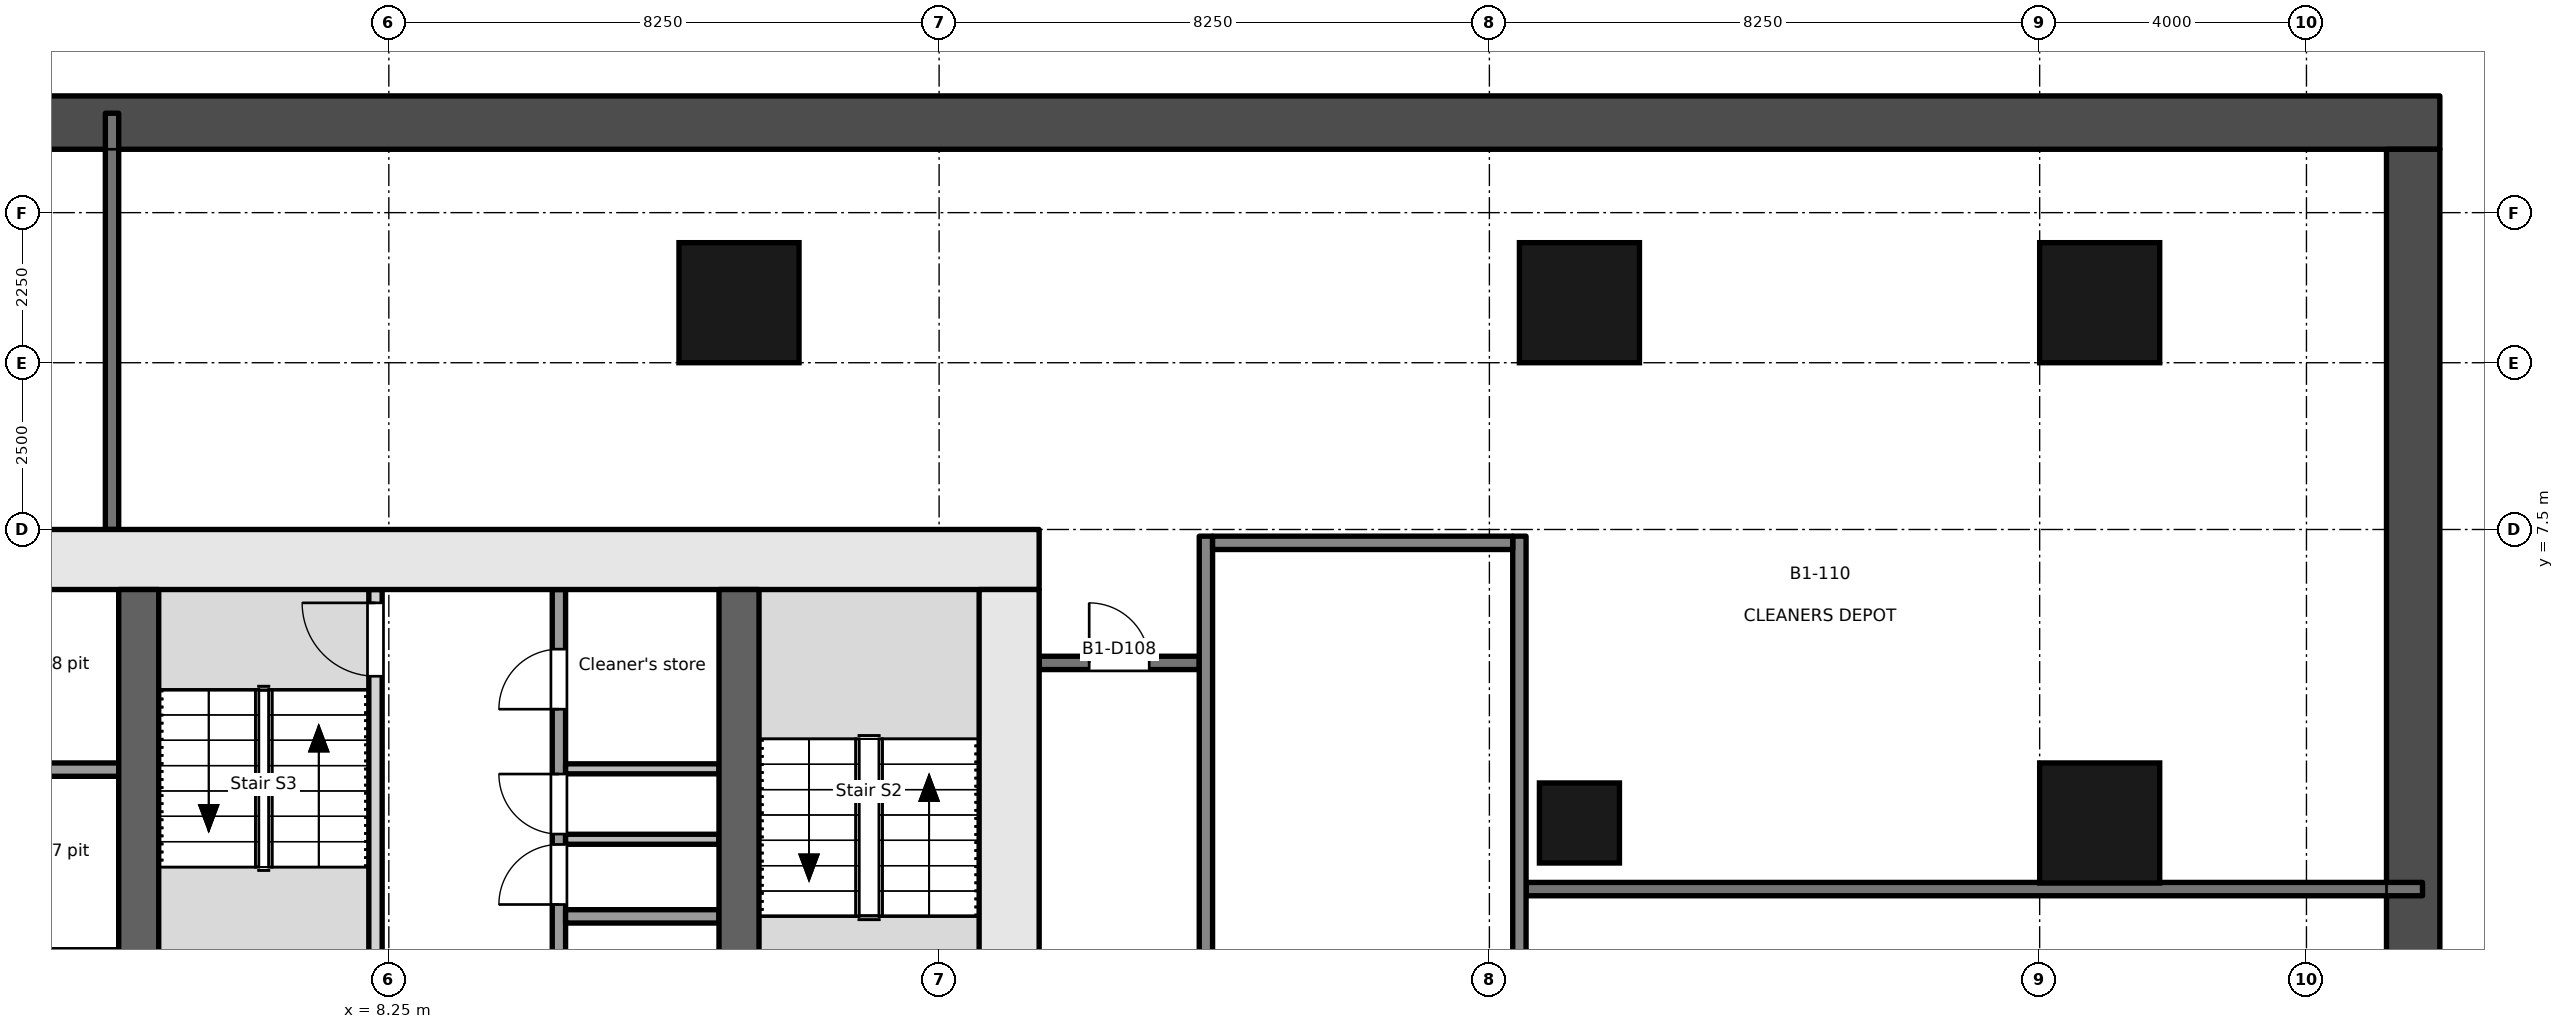
"""IFC4 building model, lengths in metres.
Left out: names, types, materials, properties, quantities, classifications, styles, units other than length and angle.
Written with IfcOpenShell. Run it as: python <this file> out.ifc"""

import sys

from ifc_helpers import new_model, si_unit, direction, frame, frame_2d, origin, origin_2d, place, context, subcontext, project, spatial, rectangle, extrude, element, fill, save


model = new_model("IFC4")
c1 = context("Model", 3, precision=1e-05, world=origin(), true_north=direction((0.0, 1.0)))
c2 = subcontext(c1, "Body", "Model", "MODEL_VIEW")
j1 = project(units=[si_unit("LENGTHUNIT", "METRE"), si_unit("PLANEANGLEUNIT", "RADIAN")], contexts=[c1])
p1 = place(None, origin())
s1 = spatial("IfcSite", under=j1, at=p1, CompositionType="ELEMENT")
p2 = place(p1, origin())
s2 = spatial("IfcBuilding", under=s1, at=p2, CompositionType="ELEMENT")
p3 = place(p2, frame((0.0, 0.0, -5.5)))
s3 = spatial("IfcBuildingStorey", under=s2, at=p3, CompositionType="ELEMENT", Elevation=-5.5)
p4 = place(p3, frame((-39.0, 13.6, -0.2), z_axis=(0.0, 0.0, 1.0), x_axis=(1.0, 0.0, 0.0)))
e1 = element("IfcWall", 1, at=p4, inside=s3, PredefinedType="SOLIDWALL", context=c2, shape_type="SweptSolid", body=[
    extrude(rectangle(XDim=78.0, YDim=0.8, at=frame_2d((39.0, 0.0))), origin(), (0.0, 0.0, 1.0), 5.5),
])
p5 = place(p3, frame((38.6, -38.7, -0.2), z_axis=(0.0, 0.0, 1.0), x_axis=(0.0, 1.0, 0.0)))
e2 = element("IfcWall", 2, at=p5, inside=s3, PredefinedType="SOLIDWALL", context=c2, shape_type="SweptSolid", body=[
    extrude(rectangle(XDim=51.9, YDim=0.8, at=frame_2d((25.95, 0.0))), origin(), (0.0, 0.0, 1.0), 5.5),
])
for number, where, z_axis, x_axis in (
    (3, (33.9, 10.9, -0.2), (0.0, 0.0, 1.0), (1.0, 0.0, 0.0)),
    (4, (33.9, 3.1, -0.2), (0.0, 0.0, 1.0), (0.0, 1.0, 0.0)),
    (5, (13.5, 10.9, -0.2), (0.0, 0.0, 1.0), (1.0, 0.0, 0.0)),
    (6, (26.1, 10.9, -0.2), (0.0, 0.0, 1.0), (1.0, 0.0, 0.0)),
):
    element("IfcColumn", number, at=place(p3, frame(where, z_axis=z_axis, x_axis=x_axis)), inside=s3, PredefinedType="COLUMN", context=c2, shape_type="SweptSolid", body=[
        extrude(rectangle(XDim=1.8, YDim=1.8, at=origin_2d()), origin(), (0.0, 0.0, 1.0), 5.5),
    ])
p6 = place(p3, frame((26.1, 3.1, -0.2), z_axis=(0.0, 0.0, 1.0), x_axis=(1.0, 0.0, 0.0)))
e7 = element("IfcColumn", 7, at=p6, inside=s3, PredefinedType="COLUMN", context=c2, shape_type="SweptSolid", body=[
    extrude(rectangle(XDim=1.2, YDim=1.2, at=origin_2d()), origin(), (0.0, 0.0, 1.0), 5.5),
])
p7 = place(p3, frame((-18.0, 7.05, -0.2), z_axis=(0.0, 0.0, 1.0), x_axis=(1.0, 0.0, 0.0)))
e8 = element("IfcWall", 8, at=p7, inside=s3, PredefinedType="SHEAR", context=c2, shape_type="SweptSolid", body=[
    extrude(rectangle(XDim=36.0, YDim=0.9, at=frame_2d((18.0, 0.0))), origin(), (0.0, 0.0, 1.0), 5.5),
])
p8 = place(p3, frame((17.55, -6.6, -0.2), z_axis=(0.0, 0.0, 1.0), x_axis=(0.0, 1.0, 0.0)))
e9 = element("IfcWall", 9, at=p8, inside=s3, PredefinedType="SHEAR", context=c2, shape_type="SweptSolid", body=[
    extrude(rectangle(XDim=13.2, YDim=0.9, at=frame_2d((6.6, 0.0))), origin(), (0.0, 0.0, 1.0), 5.5),
])
p9 = place(p8, frame((4.55, 0.0, 0.2)))
e10 = element("IfcOpeningElement", 10, at=p9, cuts=e9, PredefinedType="OPENING", context=c2, shape_type="SweptSolid", body=[
    extrude(rectangle(XDim=1.2, YDim=2.1, at=frame_2d((0.6, 1.05))), frame((0.0, 0.46, 0.0), z_axis=(0.0, -1.0, 0.0), x_axis=(1.0, 0.0, 0.0)), (0.0, 0.0, 1.0), 0.921),
])
for number, where, z_axis, x_axis in (
    (11, (4.5, -6.6, -0.2), (0.0, 0.0, 1.0), (0.0, 1.0, 0.0)),
    (12, (13.5, -6.6, -0.2), (0.0, 0.0, 1.0), (0.0, 1.0, 0.0)),
):
    element("IfcWall", number, at=place(p3, frame(where, z_axis=z_axis, x_axis=x_axis)), inside=s3, PredefinedType="SHEAR", context=c2, shape_type="SweptSolid", body=[
        extrude(rectangle(XDim=13.2, YDim=0.6, at=frame_2d((6.6, 0.0))), origin(), (0.0, 0.0, 1.0), 5.5),
    ])
p10 = place(p3, frame((1.9, 3.9, 0.0), z_axis=(0.0, 0.0, 1.0), x_axis=(1.0, 0.0, 0.0)))
e13 = element("IfcWall", 13, at=p10, inside=s3, PredefinedType="PARTITIONING", context=c2, shape_type="SweptSolid", body=[
    extrude(rectangle(XDim=2.3, YDim=0.2, at=frame_2d((1.15, 0.0))), origin(), (0.0, 0.0, 1.0), 5.3),
])
p11 = place(p3, frame((8.05, -6.6, 0.0), z_axis=(0.0, 0.0, 1.0), x_axis=(0.0, 1.0, 0.0)))
e14 = element("IfcWall", 14, at=p11, inside=s3, PredefinedType="PARTITIONING", context=c2, shape_type="SweptSolid", body=[
    extrude(rectangle(XDim=13.2, YDim=0.2, at=frame_2d((6.6, 0.0))), origin(), (0.0, 0.0, 1.0), 5.3),
])
p12 = place(p11, frame((0.502, 0.0, 0.0)))
e15 = element("IfcOpeningElement", 15, at=p12, cuts=e14, PredefinedType="OPENING", context=c2, shape_type="SweptSolid", body=[
    extrude(rectangle(XDim=0.9, YDim=2.1, at=frame_2d((0.45, 1.05))), frame((0.0, 0.111, 0.0), z_axis=(0.0, -1.0, 0.0), x_axis=(1.0, 0.0, 0.0)), (0.0, 0.0, 1.0), 0.221),
])
p13 = place(p11, frame((2.406, 0.0, 0.0)))
e16 = element("IfcOpeningElement", 16, at=p13, cuts=e14, PredefinedType="OPENING", context=c2, shape_type="SweptSolid", body=[
    extrude(rectangle(XDim=0.9, YDim=2.1, at=frame_2d((0.45, 1.05))), frame((0.0, 0.111, 0.0), z_axis=(0.0, -1.0, 0.0), x_axis=(1.0, 0.0, 0.0)), (0.0, 0.0, 1.0), 0.221),
])
p14 = place(p11, frame((4.854, 0.0, 0.0)))
e17 = element("IfcOpeningElement", 17, at=p14, cuts=e14, PredefinedType="OPENING", context=c2, shape_type="SweptSolid", body=[
    extrude(rectangle(XDim=0.9, YDim=2.1, at=frame_2d((0.45, 1.05))), frame((0.0, 0.111, 0.0), z_axis=(0.0, -1.0, 0.0), x_axis=(1.0, 0.0, 0.0)), (0.0, 0.0, 1.0), 0.221),
])
p15 = place(p11, frame((11.9, 0.0, 0.0)))
e18 = element("IfcOpeningElement", 18, at=p15, cuts=e14, PredefinedType="OPENING", context=c2, shape_type="SweptSolid", body=[
    extrude(rectangle(XDim=1.1, YDim=2.1, at=frame_2d((0.55, 1.05))), frame((0.0, 0.111, 0.0), z_axis=(0.0, -1.0, 0.0), x_axis=(1.0, 0.0, 0.0)), (0.0, 0.0, 1.0), 0.221),
])
p16 = place(p3, frame((10.8, -6.6, 0.0), z_axis=(0.0, 0.0, 1.0), x_axis=(0.0, 1.0, 0.0)))
e19 = element("IfcWall", 19, at=p16, inside=s3, PredefinedType="PARTITIONING", context=c2, shape_type="SweptSolid", body=[
    extrude(rectangle(XDim=13.2, YDim=0.2, at=frame_2d((6.6, 0.0))), origin(), (0.0, 0.0, 1.0), 5.3),
])
p17 = place(p16, frame((0.7, 0.0, 0.0)))
e20 = element("IfcOpeningElement", 20, at=p17, cuts=e19, PredefinedType="OPENING", context=c2, shape_type="SweptSolid", body=[
    extrude(rectangle(XDim=1.2, YDim=2.1, at=frame_2d((0.6, 1.05))), frame((0.0, 0.111, 0.0), z_axis=(0.0, -1.0, 0.0), x_axis=(1.0, 0.0, 0.0)), (0.0, 0.0, 1.0), 0.221),
])
p18 = place(p16, frame((8.478, 0.0, 0.0)))
e21 = element("IfcOpeningElement", 21, at=p18, cuts=e19, PredefinedType="OPENING", context=c2, shape_type="SweptSolid", body=[
    extrude(rectangle(XDim=0.9, YDim=2.1, at=frame_2d((0.45, 1.05))), frame((0.0, 0.111, 0.0), z_axis=(0.0, -1.0, 0.0), x_axis=(1.0, 0.0, 0.0)), (0.0, 0.0, 1.0), 0.221),
])
p19 = place(p16, frame((9.534, 0.0, 0.0)))
e22 = element("IfcOpeningElement", 22, at=p19, cuts=e19, PredefinedType="OPENING", context=c2, shape_type="SweptSolid", body=[
    extrude(rectangle(XDim=0.9, YDim=2.1, at=frame_2d((0.45, 1.05))), frame((0.0, 0.111, 0.0), z_axis=(0.0, -1.0, 0.0), x_axis=(1.0, 0.0, 0.0)), (0.0, 0.0, 1.0), 0.221),
])
p20 = place(p16, frame((11.406, 0.0, 0.0)))
e23 = element("IfcOpeningElement", 23, at=p20, cuts=e19, PredefinedType="OPENING", context=c2, shape_type="SweptSolid", body=[
    extrude(rectangle(XDim=0.9, YDim=2.1, at=frame_2d((0.45, 1.05))), frame((0.0, 0.111, 0.0), z_axis=(0.0, -1.0, 0.0), x_axis=(1.0, 0.0, 0.0)), (0.0, 0.0, 1.0), 0.221),
])
p21 = place(p3, frame((10.9, 1.7, 0.0), z_axis=(0.0, 0.0, 1.0), x_axis=(1.0, 0.0, 0.0)))
e24 = element("IfcWall", 24, at=p21, inside=s3, PredefinedType="PARTITIONING", context=c2, shape_type="SweptSolid", body=[
    extrude(rectangle(XDim=2.3, YDim=0.2, at=frame_2d((1.15, 0.0))), origin(), (0.0, 0.0, 1.0), 5.3),
])
for number, where, z_axis, x_axis in (
    (25, (10.9, 2.856, 0.0), (0.0, 0.0, 1.0), (1.0, 0.0, 0.0)),
    (26, (10.9, 3.912, 0.0), (0.0, 0.0, 1.0), (1.0, 0.0, 0.0)),
):
    element("IfcWall", number, at=place(p3, frame(where, z_axis=z_axis, x_axis=x_axis)), inside=s3, PredefinedType="PARTITIONING", context=c2, shape_type="SweptSolid", body=[
        extrude(rectangle(XDim=2.3, YDim=0.15, at=frame_2d((1.15, 0.0))), origin(), (0.0, 0.0, 1.0), 5.3),
    ])
for number, where, z_axis, x_axis in (
    (27, (20.5, 0.0, -0.2), (0.0, 0.0, 1.0), (0.0, 1.0, 0.0)),
    (28, (25.2, 0.0, -0.2), (0.0, 0.0, 1.0), (0.0, 1.0, 0.0)),
):
    element("IfcWall", number, at=place(p3, frame(where, z_axis=z_axis, x_axis=x_axis)), inside=s3, PredefinedType="SHEAR", context=c2, shape_type="SweptSolid", body=[
        extrude(rectangle(XDim=7.4, YDim=0.2, at=frame_2d((3.7, 0.0))), origin(), (0.0, 0.0, 1.0), 5.5),
    ])
p22 = place(p3, frame((20.6, 7.3, -0.2), z_axis=(0.0, 0.0, 1.0), x_axis=(1.0, 0.0, 0.0)))
e29 = element("IfcWall", 29, at=p22, inside=s3, PredefinedType="SHEAR", context=c2, shape_type="SweptSolid", body=[
    extrude(rectangle(XDim=4.5, YDim=0.2, at=frame_2d((2.25, 0.0))), origin(), (0.0, 0.0, 1.0), 5.5),
])
p23 = place(p3, frame((18.0, 5.5, 0.0), z_axis=(0.0, 0.0, 1.0), x_axis=(1.0, 0.0, 0.0)))
e30 = element("IfcWall", 30, at=p23, inside=s3, PredefinedType="PARTITIONING", context=c2, shape_type="SweptSolid", body=[
    extrude(rectangle(XDim=2.4, YDim=0.2, at=frame_2d((1.2, 0.0))), origin(), (0.0, 0.0, 1.0), 5.3),
])
p24 = place(p23, frame((0.75, 0.0, 0.0)))
e31 = element("IfcOpeningElement", 31, at=p24, cuts=e30, PredefinedType="OPENING", context=c2, shape_type="SweptSolid", body=[
    extrude(rectangle(XDim=0.9, YDim=2.1, at=frame_2d((0.45, 1.05))), frame((0.0, 0.111, 0.0), z_axis=(0.0, -1.0, 0.0), x_axis=(1.0, 0.0, 0.0)), (0.0, 0.0, 1.0), 0.221),
])
p25 = place(p3, frame((4.1, 13.74, 0.0), z_axis=(0.0, 0.0, 1.0), x_axis=(0.0, -1.0, 0.0)))
e32 = element("IfcWall", 32, at=p25, inside=s3, PredefinedType="PARTITIONING", context=c2, shape_type="SweptSolid", body=[
    extrude(rectangle(XDim=6.24, YDim=0.2, at=frame_2d((3.12, 0.0))), origin(), (0.0, 0.0, 1.0), 4.3),
])
p26 = place(p3, frame((25.3, 2.109, 0.0), z_axis=(0.0, 0.0, 1.0), x_axis=(1.0, 0.0, 0.0)))
e33 = element("IfcWall", 33, at=p26, inside=s3, PredefinedType="PARTITIONING", context=c2, shape_type="SweptSolid", body=[
    extrude(rectangle(XDim=13.44, YDim=0.2, at=frame_2d((6.72, 0.0))), origin(), (0.0, 0.0, 1.0), 4.1),
])
p27 = place(p15, origin())
e34 = element("IfcDoor", 34, at=p27, inside=s3, OperationType="SINGLE_SWING_RIGHT", PredefinedType="DOOR", context=c2, shape_type="SweptSolid", body=[
    extrude(rectangle(XDim=1.1, YDim=2.1, at=frame_2d((0.55, 1.05))), frame((0.0, 0.025, 0.0), z_axis=(0.0, -1.0, 0.0), x_axis=(1.0, 0.0, 0.0)), (0.0, 0.0, 1.0), 0.05),
])
fill(e18, e34)
p28 = place(p18, origin())
e35 = element("IfcDoor", 35, at=p28, inside=s3, OperationType="SINGLE_SWING_LEFT", PredefinedType="DOOR", context=c2, shape_type="SweptSolid", body=[
    extrude(rectangle(XDim=0.9, YDim=2.1, at=frame_2d((0.45, 1.05))), frame((0.0, 0.025, 0.0), z_axis=(0.0, -1.0, 0.0), x_axis=(1.0, 0.0, 0.0)), (0.0, 0.0, 1.0), 0.05),
])
fill(e21, e35)
p29 = place(p19, origin())
e36 = element("IfcDoor", 36, at=p29, inside=s3, OperationType="SINGLE_SWING_RIGHT", PredefinedType="DOOR", context=c2, shape_type="SweptSolid", body=[
    extrude(rectangle(XDim=0.9, YDim=2.1, at=frame_2d((0.45, 1.05))), frame((0.0, 0.025, 0.0), z_axis=(0.0, -1.0, 0.0), x_axis=(1.0, 0.0, 0.0)), (0.0, 0.0, 1.0), 0.05),
])
fill(e22, e36)
p30 = place(p20, origin())
e37 = element("IfcDoor", 37, at=p30, inside=s3, OperationType="SINGLE_SWING_LEFT", PredefinedType="DOOR", context=c2, shape_type="SweptSolid", body=[
    extrude(rectangle(XDim=0.9, YDim=2.1, at=frame_2d((0.45, 1.05))), frame((0.0, 0.025, 0.0), z_axis=(0.0, -1.0, 0.0), x_axis=(1.0, 0.0, 0.0)), (0.0, 0.0, 1.0), 0.05),
])
fill(e23, e37)
p31 = place(p24, origin())
e38 = element("IfcDoor", 38, at=p31, inside=s3, OperationType="SINGLE_SWING_LEFT", PredefinedType="DOOR", context=c2, shape_type="SweptSolid", body=[
    extrude(rectangle(XDim=0.9, YDim=2.1, at=frame_2d((0.45, 1.05))), frame((0.0, 0.025, 0.0), z_axis=(0.0, -1.0, 0.0), x_axis=(1.0, 0.0, 0.0)), (0.0, 0.0, 1.0), 0.05),
])
fill(e31, e38)
save(model, sys.argv[1])
